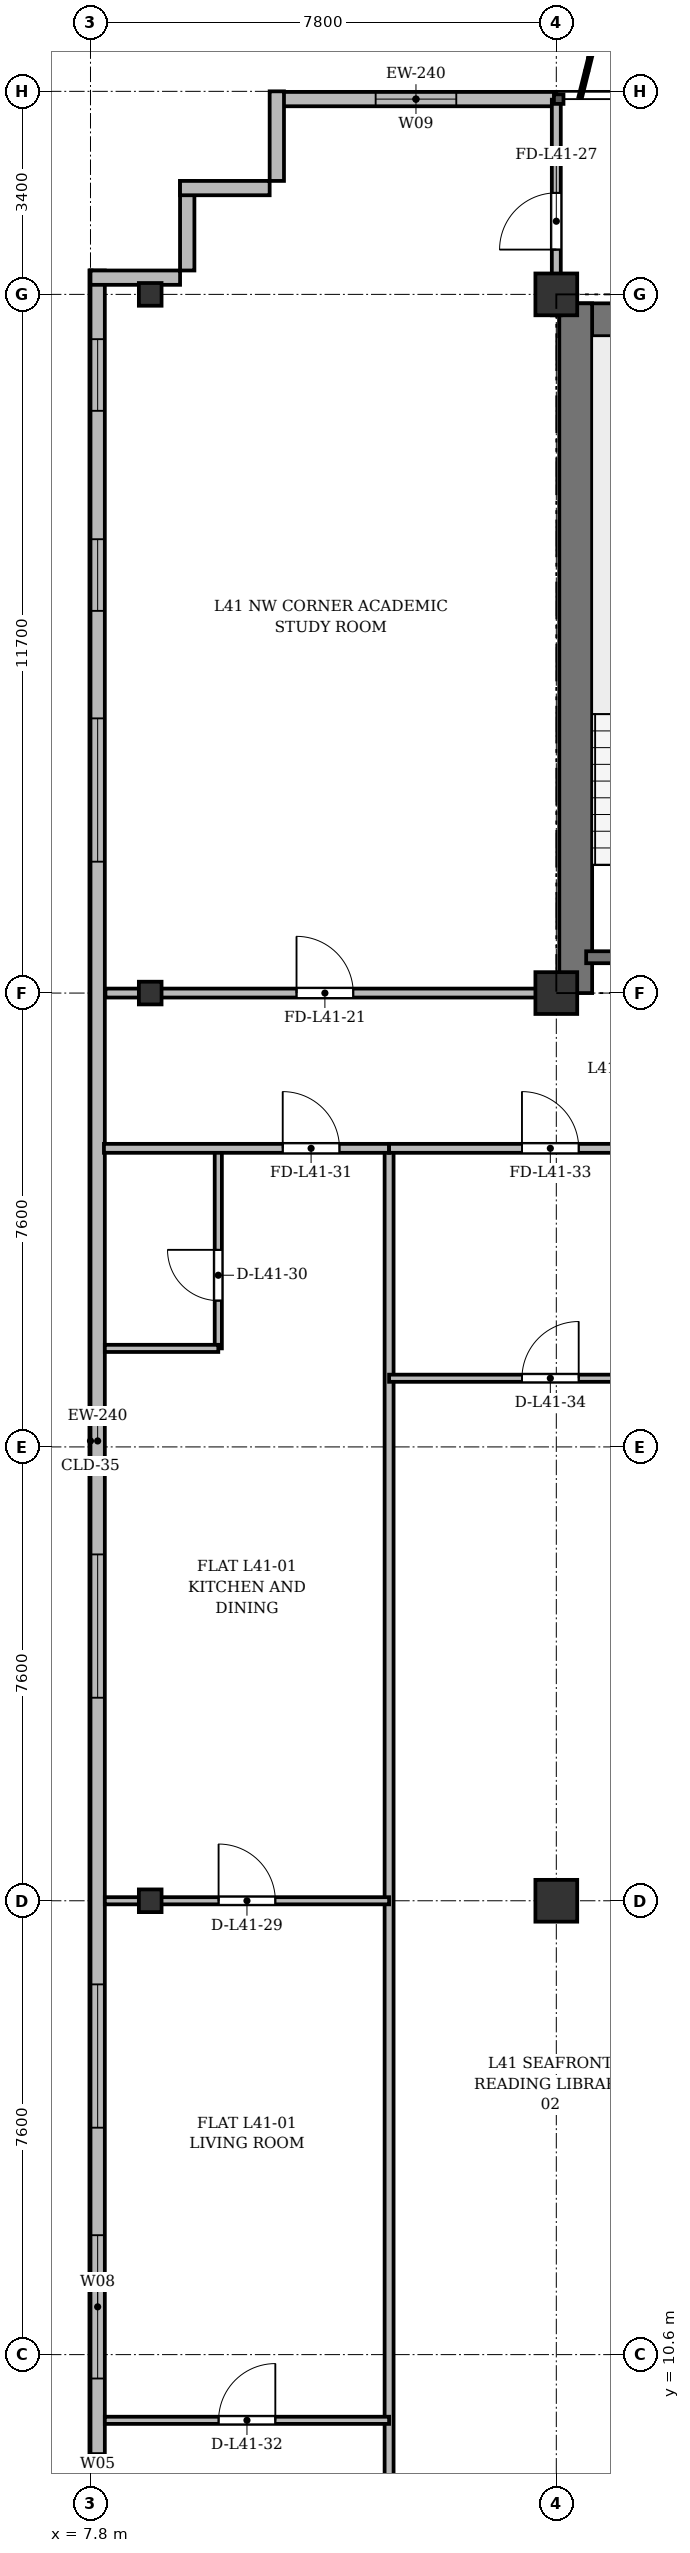
"""IFC4 building model, lengths in metres.
Left out: names, types, materials, properties, quantities, classifications, styles, units other than length and angle.
Written with IfcOpenShell. Run it as: python <this file> out.ifc"""

import sys

from ifc_helpers import new_model, si_unit, direction, frame, frame_2d, origin, origin_2d, place, context, subcontext, project, spatial, rectangle, i_section, extrude, source, transform, mapped, element, fill, save


model = new_model("IFC4")
c1 = context("Model", 3, precision=1e-05, world=origin(), true_north=direction((0.0, 1.0)))
c2 = subcontext(c1, "Body", "Model", "MODEL_VIEW")
j1 = project(units=[si_unit("LENGTHUNIT", "METRE"), si_unit("PLANEANGLEUNIT", "RADIAN")], contexts=[c1])
p1 = place(None, origin())
s1 = spatial("IfcSite", under=j1, at=p1, CompositionType="ELEMENT")
p2 = place(p1, origin())
s2 = spatial("IfcBuilding", under=s1, at=p2, CompositionType="ELEMENT")
p3 = place(p2, frame((0.0, 0.0, 157.3)))
s3 = spatial("IfcBuildingStorey", under=s2, at=p3, CompositionType="ELEMENT", Elevation=157.3)
m1 = source(origin(), c2, "Body", "SweptSolid", [
    extrude(i_section(OverallWidth=0.38, OverallDepth=0.38, WebThickness=0.02, FlangeThickness=0.03, at=origin_2d()), origin(), (0.0, 0.0, 1.0), 3.6),
])
for number, where, z_axis, x_axis in (
    (1, (8.8, 18.2, 0.0), (0.0, 0.0, 1.0), (1.0, 0.0, 0.0)),
    (2, (8.8, 33.4, 0.0), (0.0, 0.0, 1.0), (1.0, 0.0, 0.0)),
    (3, (8.8, 45.1, 0.0), (0.0, 0.0, 1.0), (1.0, 0.0, 0.0)),
):
    element("IfcColumn", number, at=place(p3, frame(where, z_axis=z_axis, x_axis=x_axis)), inside=s3, PredefinedType="COLUMN", context=c2, shape_type="MappedRepresentation", body=[
        mapped(m1, transform((0.0, 0.0, 0.0), x_axis=(1.0, 0.0, 0.0), y_axis=(0.0, 1.0, 0.0), z_axis=(0.0, 0.0, 1.0), scale=1.0)),
    ])
m2 = source(origin(), c2, "Body", "SweptSolid", [
    extrude(rectangle(XDim=0.7, YDim=0.7, at=origin_2d()), origin(), (0.0, 0.0, 1.0), 3.6),
])
for number, where, z_axis, x_axis in (
    (4, (15.6, 18.2, 0.0), (0.0, 0.0, 1.0), (1.0, 0.0, 0.0)),
    (5, (15.6, 33.4, 0.0), (0.0, 0.0, 1.0), (1.0, 0.0, 0.0)),
    (6, (15.6, 45.1, 0.0), (0.0, 0.0, 1.0), (1.0, 0.0, 0.0)),
):
    element("IfcColumn", number, at=place(p3, frame(where, z_axis=z_axis, x_axis=x_axis)), inside=s3, PredefinedType="COLUMN", context=c2, shape_type="MappedRepresentation", body=[
        mapped(m2, transform((0.0, 0.0, 0.0), x_axis=(1.0, 0.0, 0.0), y_axis=(0.0, 1.0, 0.0), z_axis=(0.0, 0.0, 1.0), scale=1.0)),
    ])
p4 = place(p3, frame((10.9, 48.37, 0.0), z_axis=(0.0, 0.0, 1.0), x_axis=(1.0, 0.0, 0.0)))
e7 = element("IfcWall", 7, at=p4, inside=s3, PredefinedType="SOLIDWALL", context=c2, shape_type="SweptSolid", body=[
    extrude(rectangle(XDim=4.7, YDim=0.24, at=frame_2d((2.35, 0.0))), origin(), (0.0, 0.0, 1.0), 3.35),
])
p5 = place(p4, frame((1.675, 0.0, 0.9)))
e8 = element("IfcOpeningElement", 8, at=p5, cuts=e7, PredefinedType="OPENING", context=c2, shape_type="SweptSolid", body=[
    extrude(rectangle(XDim=1.35, YDim=1.5, at=frame_2d((0.675, 0.75))), frame((0.0, 0.13, 0.0), z_axis=(0.0, -1.0, 0.0), x_axis=(1.0, 0.0, 0.0)), (0.0, 0.0, 1.0), 0.26),
])
p6 = place(p3, frame((7.92, 6.3, 0.0), z_axis=(0.0, 0.0, 1.0), x_axis=(0.0, 1.0, 0.0)))
e9 = element("IfcWall", 9, at=p6, inside=s3, PredefinedType="SOLIDWALL", context=c2, shape_type="SweptSolid", body=[
    extrude(rectangle(XDim=39.2, YDim=0.24, at=frame_2d((19.6, 0.0))), origin(), (0.0, 0.0, 1.0), 3.35),
])
p7 = place(p6, frame((1.45, 0.0, 0.92)))
e10 = element("IfcOpeningElement", 10, at=p7, cuts=e9, PredefinedType="OPENING", context=c2, shape_type="SweptSolid", body=[
    extrude(rectangle(XDim=1.2, YDim=1.65, at=frame_2d((0.6, 0.825))), frame((0.0, 0.13, 0.0), z_axis=(0.0, -1.0, 0.0), x_axis=(1.0, 0.0, 0.0)), (0.0, 0.0, 1.0), 0.26),
])
p8 = place(p6, frame((3.9, 0.0, 0.92)))
e11 = element("IfcOpeningElement", 11, at=p8, cuts=e9, PredefinedType="OPENING", context=c2, shape_type="SweptSolid", body=[
    extrude(rectangle(XDim=2.4, YDim=2.1, at=frame_2d((1.2, 1.05))), frame((0.0, 0.13, 0.0), z_axis=(0.0, -1.0, 0.0), x_axis=(1.0, 0.0, 0.0)), (0.0, 0.0, 1.0), 0.26),
])
p9 = place(p6, frame((8.1, 0.0, 0.92)))
e12 = element("IfcOpeningElement", 12, at=p9, cuts=e9, PredefinedType="OPENING", context=c2, shape_type="SweptSolid", body=[
    extrude(rectangle(XDim=2.4, YDim=2.1, at=frame_2d((1.2, 1.05))), frame((0.0, 0.13, 0.0), z_axis=(0.0, -1.0, 0.0), x_axis=(1.0, 0.0, 0.0)), (0.0, 0.0, 1.0), 0.26),
])
p10 = place(p6, frame((15.3, 0.0, 0.92)))
e13 = element("IfcOpeningElement", 13, at=p10, cuts=e9, PredefinedType="OPENING", context=c2, shape_type="SweptSolid", body=[
    extrude(rectangle(XDim=2.4, YDim=2.1, at=frame_2d((1.2, 1.05))), frame((0.0, 0.13, 0.0), z_axis=(0.0, -1.0, 0.0), x_axis=(1.0, 0.0, 0.0)), (0.0, 0.0, 1.0), 0.26),
])
p11 = place(p6, frame((29.3, 0.0, 0.92)))
e14 = element("IfcOpeningElement", 14, at=p11, cuts=e9, PredefinedType="OPENING", context=c2, shape_type="SweptSolid", body=[
    extrude(rectangle(XDim=2.4, YDim=2.1, at=frame_2d((1.2, 1.05))), frame((0.0, 0.13, 0.0), z_axis=(0.0, -1.0, 0.0), x_axis=(1.0, 0.0, 0.0)), (0.0, 0.0, 1.0), 0.26),
])
p12 = place(p6, frame((33.5, 0.0, 0.92)))
e15 = element("IfcOpeningElement", 15, at=p12, cuts=e9, PredefinedType="OPENING", context=c2, shape_type="SweptSolid", body=[
    extrude(rectangle(XDim=1.2, YDim=1.65, at=frame_2d((0.6, 0.825))), frame((0.0, 0.13, 0.0), z_axis=(0.0, -1.0, 0.0), x_axis=(1.0, 0.0, 0.0)), (0.0, 0.0, 1.0), 0.26),
])
p13 = place(p6, frame((36.85, 0.0, 0.92)))
e16 = element("IfcOpeningElement", 16, at=p13, cuts=e9, PredefinedType="OPENING", context=c2, shape_type="SweptSolid", body=[
    extrude(rectangle(XDim=1.2, YDim=1.65, at=frame_2d((0.6, 0.825))), frame((0.0, 0.13, 0.0), z_axis=(0.0, -1.0, 0.0), x_axis=(1.0, 0.0, 0.0)), (0.0, 0.0, 1.0), 0.26),
])
for number, where, z_axis, x_axis in (
    (17, (7.8, 45.38, 0.0), (0.0, 0.0, 1.0), (1.0, 0.0, 0.0)),
    (18, (9.42, 45.5, 0.0), (0.0, 0.0, 1.0), (0.0, 1.0, 0.0)),
    (19, (9.3, 46.88, 0.0), (0.0, 0.0, 1.0), (1.0, 0.0, 0.0)),
    (20, (10.92, 47.0, 0.0), (0.0, 0.0, 1.0), (0.0, 1.0, 0.0)),
):
    element("IfcWall", number, at=place(p3, frame(where, z_axis=z_axis, x_axis=x_axis)), inside=s3, PredefinedType="SOLIDWALL", context=c2, shape_type="SweptSolid", body=[
        extrude(rectangle(XDim=1.5, YDim=0.24, at=frame_2d((0.75, 0.0))), origin(), (0.0, 0.0, 1.0), 3.35),
    ])
p14 = place(p3, frame((15.65, 44.675, 0.0), z_axis=(0.0, 0.0, 1.0), x_axis=(1.0, 0.0, 0.0)))
e21 = element("IfcWall", 21, at=p14, inside=s3, PredefinedType="SHEAR", context=c2, shape_type="SweptSolid", body=[
    extrude(rectangle(XDim=43.1, YDim=0.55, at=frame_2d((21.55, 0.0))), origin(), (0.0, 0.0, 1.0), 3.35),
])
p15 = place(p3, frame((15.925, 33.4, 0.0), z_axis=(0.0, 0.0, 1.0), x_axis=(0.0, 1.0, 0.0)))
e22 = element("IfcWall", 22, at=p15, inside=s3, PredefinedType="SHEAR", context=c2, shape_type="SweptSolid", body=[
    extrude(rectangle(XDim=11.55, YDim=0.55, at=frame_2d((5.775, 0.0))), origin(), (0.0, 0.0, 1.0), 3.35),
])
p16 = place(p3, frame((16.1, 34.0, 0.0), z_axis=(0.0, 0.0, 1.0), x_axis=(1.0, 0.0, 0.0)))
e23 = element("IfcWall", 23, at=p16, inside=s3, PredefinedType="SHEAR", context=c2, shape_type="SweptSolid", body=[
    extrude(rectangle(XDim=3.4, YDim=0.2, at=frame_2d((1.7, 0.0))), origin(), (0.0, 0.0, 1.0), 3.35),
])
p17 = place(p3, frame((8.05, 33.4, 0.0), z_axis=(0.0, 0.0, 1.0), x_axis=(1.0, 0.0, 0.0)))
e24 = element("IfcWall", 24, at=p17, inside=s3, PredefinedType="PARTITIONING", context=c2, shape_type="SweptSolid", body=[
    extrude(rectangle(XDim=7.55, YDim=0.15, at=frame_2d((3.775, 0.0))), origin(), (0.0, 0.0, 1.0), 2.75),
])
p18 = place(p17, frame((3.2, 0.0, 0.0)))
e25 = element("IfcOpeningElement", 25, at=p18, cuts=e24, PredefinedType="OPENING", context=c2, shape_type="SweptSolid", body=[
    extrude(rectangle(XDim=0.95, YDim=2.15, at=frame_2d((0.475, 1.075))), frame((0.0, 0.085, 0.0), z_axis=(0.0, -1.0, 0.0), x_axis=(1.0, 0.0, 0.0)), (0.0, 0.0, 1.0), 0.17),
])
p19 = place(p3, frame((15.6, 44.75, 0.0), z_axis=(0.0, 0.0, 1.0), x_axis=(0.0, 1.0, 0.0)))
e26 = element("IfcWall", 26, at=p19, inside=s3, PredefinedType="PARTITIONING", context=c2, shape_type="SweptSolid", body=[
    extrude(rectangle(XDim=3.61, YDim=0.15, at=frame_2d((1.805, 0.0))), origin(), (0.0, 0.0, 1.0), 2.85),
])
p20 = place(p19, frame((1.1, 0.0, 0.0)))
e27 = element("IfcOpeningElement", 27, at=p20, cuts=e26, PredefinedType="OPENING", context=c2, shape_type="SweptSolid", body=[
    extrude(rectangle(XDim=0.95, YDim=2.15, at=frame_2d((0.475, 1.075))), frame((0.0, 0.085, 0.0), z_axis=(0.0, -1.0, 0.0), x_axis=(1.0, 0.0, 0.0)), (0.0, 0.0, 1.0), 0.17),
])
p21 = place(p3, frame((12.8, 3.525, 0.0), z_axis=(0.0, 0.0, 1.0), x_axis=(0.0, 1.0, 0.0)))
e28 = element("IfcWall", 28, at=p21, inside=s3, PredefinedType="PARTITIONING", context=c2, shape_type="SweptSolid", body=[
    extrude(rectangle(XDim=27.275, YDim=0.15, at=frame_2d((13.638, 0.0))), origin(), (0.0, 0.0, 1.0), 2.75),
])
p22 = place(p3, frame((8.04, 18.2, 0.0), z_axis=(0.0, 0.0, 1.0), x_axis=(1.0, 0.0, 0.0)))
e29 = element("IfcWall", 29, at=p22, inside=s3, PredefinedType="PARTITIONING", context=c2, shape_type="SweptSolid", body=[
    extrude(rectangle(XDim=4.76, YDim=0.12, at=frame_2d((2.38, 0.0))), origin(), (0.0, 0.0, 1.0), 2.75),
])
p23 = place(p22, frame((1.905, 0.0, 0.0)))
e30 = element("IfcOpeningElement", 30, at=p23, cuts=e29, PredefinedType="OPENING", context=c2, shape_type="SweptSolid", body=[
    extrude(rectangle(XDim=0.95, YDim=2.15, at=frame_2d((0.475, 1.075))), frame((0.0, 0.07, 0.0), z_axis=(0.0, -1.0, 0.0), x_axis=(1.0, 0.0, 0.0)), (0.0, 0.0, 1.0), 0.14),
])
p24 = place(p3, frame((9.94, 27.45, 0.0), z_axis=(0.0, 0.0, 1.0), x_axis=(0.0, 1.0, 0.0)))
e31 = element("IfcWall", 31, at=p24, inside=s3, PredefinedType="PARTITIONING", context=c2, shape_type="SweptSolid", body=[
    extrude(rectangle(XDim=3.35, YDim=0.12, at=frame_2d((1.675, 0.0))), origin(), (0.0, 0.0, 1.0), 3.35),
])
p25 = place(p24, frame((0.8, 0.0, 0.0)))
e32 = element("IfcOpeningElement", 32, at=p25, cuts=e31, PredefinedType="OPENING", context=c2, shape_type="SweptSolid", body=[
    extrude(rectangle(XDim=0.85, YDim=2.1, at=frame_2d((0.425, 1.05))), frame((0.0, 0.07, 0.0), z_axis=(0.0, -1.0, 0.0), x_axis=(1.0, 0.0, 0.0)), (0.0, 0.0, 1.0), 0.14),
])
p26 = place(p3, frame((8.04, 27.45, 0.0), z_axis=(0.0, 0.0, 1.0), x_axis=(1.0, 0.0, 0.0)))
e33 = element("IfcWall", 33, at=p26, inside=s3, PredefinedType="PARTITIONING", context=c2, shape_type="SweptSolid", body=[
    extrude(rectangle(XDim=1.9, YDim=0.12, at=frame_2d((0.95, 0.0))), origin(), (0.0, 0.0, 1.0), 2.85),
])
p27 = place(p3, frame((8.025, 30.8, 0.0), z_axis=(0.0, 0.0, 1.0), x_axis=(1.0, 0.0, 0.0)))
e34 = element("IfcWall", 34, at=p27, inside=s3, PredefinedType="PARTITIONING", context=c2, shape_type="SweptSolid", body=[
    extrude(rectangle(XDim=4.775, YDim=0.15, at=frame_2d((2.388, 0.0))), origin(), (0.0, 0.0, 1.0), 2.85),
])
p28 = place(p27, frame((2.994, 0.0, 0.0)))
e35 = element("IfcOpeningElement", 35, at=p28, cuts=e34, PredefinedType="OPENING", context=c2, shape_type="SweptSolid", body=[
    extrude(rectangle(XDim=0.95, YDim=2.15, at=frame_2d((0.475, 1.075))), frame((0.0, 0.085, 0.0), z_axis=(0.0, -1.0, 0.0), x_axis=(1.0, 0.0, 0.0)), (0.0, 0.0, 1.0), 0.17),
])
p29 = place(p3, frame((8.04, 9.5, 0.0), z_axis=(0.0, 0.0, 1.0), x_axis=(1.0, 0.0, 0.0)))
e36 = element("IfcWall", 36, at=p29, inside=s3, PredefinedType="PARTITIONING", context=c2, shape_type="SweptSolid", body=[
    extrude(rectangle(XDim=4.76, YDim=0.12, at=frame_2d((2.38, 0.0))), origin(), (0.0, 0.0, 1.0), 2.85),
])
p30 = place(p29, frame((1.905, 0.0, 0.0)))
e37 = element("IfcOpeningElement", 37, at=p30, cuts=e36, PredefinedType="OPENING", context=c2, shape_type="SweptSolid", body=[
    extrude(rectangle(XDim=0.95, YDim=2.15, at=frame_2d((0.475, 1.075))), frame((0.0, 0.07, 0.0), z_axis=(0.0, -1.0, 0.0), x_axis=(1.0, 0.0, 0.0)), (0.0, 0.0, 1.0), 0.14),
])
p31 = place(p3, frame((12.8, 30.8, 0.0), z_axis=(0.0, 0.0, 1.0), x_axis=(1.0, 0.0, 0.0)))
e38 = element("IfcWall", 38, at=p31, inside=s3, PredefinedType="PARTITIONING", context=c2, shape_type="SweptSolid", body=[
    extrude(rectangle(XDim=5.4, YDim=0.15, at=frame_2d((2.7, 0.0))), origin(), (0.0, 0.0, 1.0), 2.85),
])
p32 = place(p31, frame((2.225, 0.0, 0.0)))
e39 = element("IfcOpeningElement", 39, at=p32, cuts=e38, PredefinedType="OPENING", context=c2, shape_type="SweptSolid", body=[
    extrude(rectangle(XDim=0.95, YDim=2.15, at=frame_2d((0.475, 1.075))), frame((0.0, 0.085, 0.0), z_axis=(0.0, -1.0, 0.0), x_axis=(1.0, 0.0, 0.0)), (0.0, 0.0, 1.0), 0.17),
])
p33 = place(p3, frame((12.8, 26.95, 0.0), z_axis=(0.0, 0.0, 1.0), x_axis=(1.0, 0.0, 0.0)))
e40 = element("IfcWall", 40, at=p33, inside=s3, PredefinedType="PARTITIONING", context=c2, shape_type="SweptSolid", body=[
    extrude(rectangle(XDim=5.4, YDim=0.12, at=frame_2d((2.7, 0.0))), origin(), (0.0, 0.0, 1.0), 2.85),
])
p34 = place(p33, frame((2.225, 0.0, 0.0)))
e41 = element("IfcOpeningElement", 41, at=p34, cuts=e40, PredefinedType="OPENING", context=c2, shape_type="SweptSolid", body=[
    extrude(rectangle(XDim=0.95, YDim=2.15, at=frame_2d((0.475, 1.075))), frame((0.0, 0.07, 0.0), z_axis=(0.0, -1.0, 0.0), x_axis=(1.0, 0.0, 0.0)), (0.0, 0.0, 1.0), 0.14),
])
m3 = source(origin(), c2, "Body", "SweptSolid", [
    extrude(rectangle(XDim=1.35, YDim=1.5, at=frame_2d((0.675, 0.75))), frame((0.0, 0.03, 0.0), z_axis=(0.0, -1.0, 0.0), x_axis=(1.0, 0.0, 0.0)), (0.0, 0.0, 1.0), 0.06),
])
p35 = place(p5, origin())
e42 = element("IfcWindow", 42, at=p35, inside=s3, PartitioningType="SINGLE_PANEL", PredefinedType="WINDOW", context=c2, shape_type="MappedRepresentation", body=[
    mapped(m3, transform((0.0, 0.0, 0.0), x_axis=(1.0, 0.0, 0.0), y_axis=(0.0, 1.0, 0.0), z_axis=(0.0, 0.0, 1.0), scale=1.0)),
])
fill(e8, e42)
m4 = source(origin(), c2, "Body", "SweptSolid", [
    extrude(rectangle(XDim=1.2, YDim=1.65, at=frame_2d((0.6, 0.825))), frame((0.0, 0.03, 0.0), z_axis=(0.0, -1.0, 0.0), x_axis=(1.0, 0.0, 0.0)), (0.0, 0.0, 1.0), 0.06),
])
p36 = place(p7, origin())
e43 = element("IfcWindow", 43, at=p36, inside=s3, PartitioningType="SINGLE_PANEL", PredefinedType="WINDOW", context=c2, shape_type="MappedRepresentation", body=[
    mapped(m4, transform((0.0, 0.0, 0.0), x_axis=(1.0, 0.0, 0.0), y_axis=(0.0, 1.0, 0.0), z_axis=(0.0, 0.0, 1.0), scale=1.0)),
])
fill(e10, e43)
m5 = source(origin(), c2, "Body", "SweptSolid", [
    extrude(rectangle(XDim=2.4, YDim=2.1, at=frame_2d((1.2, 1.05))), frame((0.0, 0.03, 0.0), z_axis=(0.0, -1.0, 0.0), x_axis=(1.0, 0.0, 0.0)), (0.0, 0.0, 1.0), 0.06),
])
p37 = place(p8, origin())
e44 = element("IfcWindow", 44, at=p37, inside=s3, PartitioningType="SINGLE_PANEL", PredefinedType="WINDOW", context=c2, shape_type="MappedRepresentation", body=[
    mapped(m5, transform((0.0, 0.0, 0.0), x_axis=(1.0, 0.0, 0.0), y_axis=(0.0, 1.0, 0.0), z_axis=(0.0, 0.0, 1.0), scale=1.0)),
])
fill(e11, e44)
p38 = place(p9, origin())
e45 = element("IfcWindow", 45, at=p38, inside=s3, PartitioningType="SINGLE_PANEL", PredefinedType="WINDOW", context=c2, shape_type="MappedRepresentation", body=[
    mapped(m5, transform((0.0, 0.0, 0.0), x_axis=(1.0, 0.0, 0.0), y_axis=(0.0, 1.0, 0.0), z_axis=(0.0, 0.0, 1.0), scale=1.0)),
])
fill(e12, e45)
p39 = place(p10, origin())
e46 = element("IfcWindow", 46, at=p39, inside=s3, PartitioningType="SINGLE_PANEL", PredefinedType="WINDOW", context=c2, shape_type="MappedRepresentation", body=[
    mapped(m5, transform((0.0, 0.0, 0.0), x_axis=(1.0, 0.0, 0.0), y_axis=(0.0, 1.0, 0.0), z_axis=(0.0, 0.0, 1.0), scale=1.0)),
])
fill(e13, e46)
p40 = place(p11, origin())
e47 = element("IfcWindow", 47, at=p40, inside=s3, PartitioningType="SINGLE_PANEL", PredefinedType="WINDOW", context=c2, shape_type="MappedRepresentation", body=[
    mapped(m5, transform((0.0, 0.0, 0.0), x_axis=(1.0, 0.0, 0.0), y_axis=(0.0, 1.0, 0.0), z_axis=(0.0, 0.0, 1.0), scale=1.0)),
])
fill(e14, e47)
p41 = place(p12, origin())
e48 = element("IfcWindow", 48, at=p41, inside=s3, PartitioningType="SINGLE_PANEL", PredefinedType="WINDOW", context=c2, shape_type="MappedRepresentation", body=[
    mapped(m4, transform((0.0, 0.0, 0.0), x_axis=(1.0, 0.0, 0.0), y_axis=(0.0, 1.0, 0.0), z_axis=(0.0, 0.0, 1.0), scale=1.0)),
])
fill(e15, e48)
p42 = place(p13, origin())
e49 = element("IfcWindow", 49, at=p42, inside=s3, PartitioningType="SINGLE_PANEL", PredefinedType="WINDOW", context=c2, shape_type="MappedRepresentation", body=[
    mapped(m4, transform((0.0, 0.0, 0.0), x_axis=(1.0, 0.0, 0.0), y_axis=(0.0, 1.0, 0.0), z_axis=(0.0, 0.0, 1.0), scale=1.0)),
])
fill(e16, e49)
m6 = source(origin(), c2, "Body", "SweptSolid", [
    extrude(rectangle(XDim=0.95, YDim=2.15, at=frame_2d((0.475, 1.075))), frame((0.0, 0.025, 0.0), z_axis=(0.0, -1.0, 0.0), x_axis=(1.0, 0.0, 0.0)), (0.0, 0.0, 1.0), 0.05),
])
p43 = place(p18, origin())
e50 = element("IfcDoor", 50, at=p43, inside=s3, OperationType="SINGLE_SWING_LEFT", PredefinedType="DOOR", context=c2, shape_type="MappedRepresentation", body=[
    mapped(m6, transform((0.0, 0.0, 0.0), x_axis=(1.0, 0.0, 0.0), y_axis=(0.0, 1.0, 0.0), z_axis=(0.0, 0.0, 1.0), scale=1.0)),
])
fill(e25, e50)
p44 = place(p20, origin())
e51 = element("IfcDoor", 51, at=p44, inside=s3, OperationType="SINGLE_SWING_LEFT", PredefinedType="DOOR", context=c2, shape_type="MappedRepresentation", body=[
    mapped(m6, transform((0.0, 0.0, 0.0), x_axis=(1.0, 0.0, 0.0), y_axis=(0.0, 1.0, 0.0), z_axis=(0.0, 0.0, 1.0), scale=1.0)),
])
fill(e27, e51)
p45 = place(p23, origin())
e52 = element("IfcDoor", 52, at=p45, inside=s3, OperationType="SINGLE_SWING_LEFT", PredefinedType="DOOR", context=c2, shape_type="MappedRepresentation", body=[
    mapped(m6, transform((0.0, 0.0, 0.0), x_axis=(1.0, 0.0, 0.0), y_axis=(0.0, 1.0, 0.0), z_axis=(0.0, 0.0, 1.0), scale=1.0)),
])
fill(e30, e52)
m7 = source(origin(), c2, "Body", "SweptSolid", [
    extrude(rectangle(XDim=0.85, YDim=2.1, at=frame_2d((0.425, 1.05))), frame((0.0, 0.025, 0.0), z_axis=(0.0, -1.0, 0.0), x_axis=(1.0, 0.0, 0.0)), (0.0, 0.0, 1.0), 0.05),
])
p46 = place(p25, origin())
e53 = element("IfcDoor", 53, at=p46, inside=s3, OperationType="SINGLE_SWING_RIGHT", PredefinedType="DOOR", context=c2, shape_type="MappedRepresentation", body=[
    mapped(m7, transform((0.0, 0.0, 0.0), x_axis=(1.0, 0.0, 0.0), y_axis=(0.0, 1.0, 0.0), z_axis=(0.0, 0.0, 1.0), scale=1.0)),
])
fill(e32, e53)
p47 = place(p28, origin())
e54 = element("IfcDoor", 54, at=p47, inside=s3, OperationType="SINGLE_SWING_LEFT", PredefinedType="DOOR", context=c2, shape_type="MappedRepresentation", body=[
    mapped(m6, transform((0.0, 0.0, 0.0), x_axis=(1.0, 0.0, 0.0), y_axis=(0.0, 1.0, 0.0), z_axis=(0.0, 0.0, 1.0), scale=1.0)),
])
fill(e35, e54)
p48 = place(p30, origin())
e55 = element("IfcDoor", 55, at=p48, inside=s3, OperationType="SINGLE_SWING_RIGHT", PredefinedType="DOOR", context=c2, shape_type="MappedRepresentation", body=[
    mapped(m6, transform((0.0, 0.0, 0.0), x_axis=(1.0, 0.0, 0.0), y_axis=(0.0, 1.0, 0.0), z_axis=(0.0, 0.0, 1.0), scale=1.0)),
])
fill(e37, e55)
p49 = place(p32, origin())
e56 = element("IfcDoor", 56, at=p49, inside=s3, OperationType="SINGLE_SWING_LEFT", PredefinedType="DOOR", context=c2, shape_type="MappedRepresentation", body=[
    mapped(m6, transform((0.0, 0.0, 0.0), x_axis=(1.0, 0.0, 0.0), y_axis=(0.0, 1.0, 0.0), z_axis=(0.0, 0.0, 1.0), scale=1.0)),
])
fill(e39, e56)
p50 = place(p34, origin())
e57 = element("IfcDoor", 57, at=p50, inside=s3, OperationType="SINGLE_SWING_RIGHT", PredefinedType="DOOR", context=c2, shape_type="MappedRepresentation", body=[
    mapped(m6, transform((0.0, 0.0, 0.0), x_axis=(1.0, 0.0, 0.0), y_axis=(0.0, 1.0, 0.0), z_axis=(0.0, 0.0, 1.0), scale=1.0)),
])
fill(e41, e57)
save(model, sys.argv[1])
